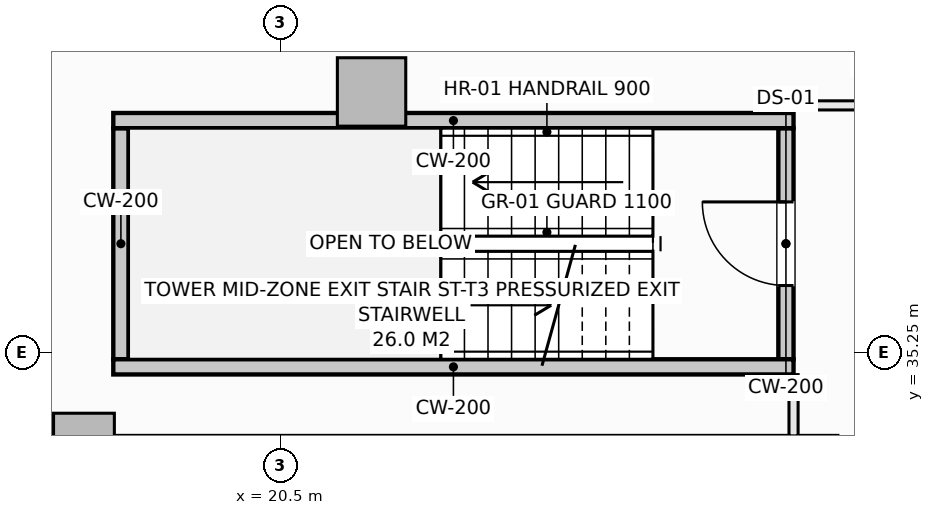
"""IFC4 building model, lengths in metres.
Left out: names, types, materials, properties, quantities, classifications, styles, units other than length and angle.
Written with IfcOpenShell. Run it as: python <this file> out.ifc"""

import sys

from ifc_helpers import new_model, si_unit, direction, frame, frame_2d, origin, origin_2d, place, context, subcontext, project, spatial, rectangle, extrude, element, fill, save


model = new_model("IFC4")
c1 = context("Model", 3, precision=1e-05, world=origin(), true_north=direction((0.0, 1.0)))
c2 = subcontext(c1, "Body", "Model", "MODEL_VIEW")
j1 = project(units=[si_unit("LENGTHUNIT", "METRE"), si_unit("PLANEANGLEUNIT", "RADIAN")], contexts=[c1])
p1 = place(None, origin())
s1 = spatial("IfcSite", under=j1, at=p1, CompositionType="ELEMENT")
p2 = place(p1, origin())
s2 = spatial("IfcBuilding", under=s1, at=p2, CompositionType="ELEMENT")
p3 = place(p2, frame((0.0, 0.0, 163.1)))
s3 = spatial("IfcBuildingStorey", under=s2, at=p3, CompositionType="ELEMENT", Elevation=163.1)
p4 = place(p3, frame((21.698, 38.677, -0.27), z_axis=(0.0, 0.0, 1.0), x_axis=(1.0, 0.0, 0.0)))
e1 = element("IfcColumn", 1, at=p4, inside=s3, PredefinedType="COLUMN", context=c2, shape_type="SweptSolid", body=[
    extrude(rectangle(XDim=0.9, YDim=0.9, at=origin_2d()), origin(), (0.0, 0.0, 1.0), 3.4),
])
p5 = place(p3, frame((17.914, 34.05, -0.27), z_axis=(0.0, 0.0, 1.0), x_axis=(1.0, 0.0, 0.0)))
e2 = element("IfcColumn", 2, at=p5, inside=s3, PredefinedType="PILASTER", context=c2, shape_type="SweptSolid", body=[
    extrude(rectangle(XDim=0.8, YDim=0.8, at=origin_2d()), origin(), (0.0, 0.0, 1.0), 3.4),
])
p6 = place(p3, frame((27.15, 35.16, -0.27), z_axis=(0.0, 0.0, 1.0), x_axis=(0.0, 1.0, 0.0)))
e3 = element("IfcWall", 3, at=p6, inside=s3, PredefinedType="SHEAR", context=c2, shape_type="SweptSolid", body=[
    extrude(rectangle(XDim=3.04, YDim=0.2, at=frame_2d((1.52, 0.0))), origin(), (0.0, 0.0, 1.0), 3.4),
])
p7 = place(p6, frame((0.97, 0.0, 0.27)))
e4 = element("IfcOpeningElement", 4, at=p7, cuts=e3, PredefinedType="OPENING", context=c2, shape_type="SweptSolid", body=[
    extrude(rectangle(XDim=1.1, YDim=2.15, at=frame_2d((0.55, 1.075))), frame((0.0, 0.11, 0.0), z_axis=(0.0, -1.0, 0.0), x_axis=(1.0, 0.0, 0.0)), (0.0, 0.0, 1.0), 0.22),
])
p8 = place(p3, frame((18.4, 35.16, -0.27), z_axis=(0.0, 0.0, 1.0), x_axis=(0.0, 1.0, 0.0)))
e5 = element("IfcWall", 5, at=p8, inside=s3, PredefinedType="SHEAR", context=c2, shape_type="SweptSolid", body=[
    extrude(rectangle(XDim=3.04, YDim=0.2, at=frame_2d((1.52, 0.0))), origin(), (0.0, 0.0, 1.0), 3.4),
])
for number, where, z_axis, x_axis in (
    (6, (18.3, 38.3, -0.27), (0.0, 0.0, 1.0), (1.0, 0.0, 0.0)),
    (7, (18.3, 35.06, -0.27), (0.0, 0.0, 1.0), (1.0, 0.0, 0.0)),
):
    element("IfcWall", number, at=place(p3, frame(where, z_axis=z_axis, x_axis=x_axis)), inside=s3, PredefinedType="SHEAR", context=c2, shape_type="SweptSolid", body=[
        extrude(rectangle(XDim=8.95, YDim=0.2, at=frame_2d((4.475, 0.0))), origin(), (0.0, 0.0, 1.0), 3.4),
    ])
p9 = place(p3, frame((27.25, 34.152, 0.0), z_axis=(0.0, 0.0, 1.0), x_axis=(0.0, 1.0, 0.0)))
e8 = element("IfcWall", 8, at=p9, inside=s3, PredefinedType="PARTITIONING", context=c2, shape_type="SweptSolid", body=[
    extrude(rectangle(XDim=0.806, YDim=0.12, at=frame_2d((0.403, 0.0))), origin(), (0.0, 0.0, 1.0), 3.13),
])
p10 = place(p3, frame((27.25, 38.5, 0.0), z_axis=(0.0, 0.0, 1.0), x_axis=(1.0, 0.0, 0.0)))
e9 = element("IfcWall", 9, at=p10, inside=s3, PredefinedType="PARTITIONING", context=c2, shape_type="SweptSolid", body=[
    extrude(rectangle(XDim=2.53, YDim=0.12, at=frame_2d((1.265, 0.0))), origin(), (0.0, 0.0, 1.0), 3.13),
])
p11 = place(p7, origin())
e10 = element("IfcDoor", 10, at=p11, inside=s3, OperationType="SINGLE_SWING_RIGHT", PredefinedType="DOOR", context=c2, shape_type="SweptSolid", body=[
    extrude(rectangle(XDim=1.1, YDim=2.15, at=frame_2d((0.55, 1.075))), frame((0.0, 0.025, 0.0), z_axis=(0.0, -1.0, 0.0), x_axis=(1.0, 0.0, 0.0)), (0.0, 0.0, 1.0), 0.05),
])
fill(e4, e10)
save(model, sys.argv[1])
